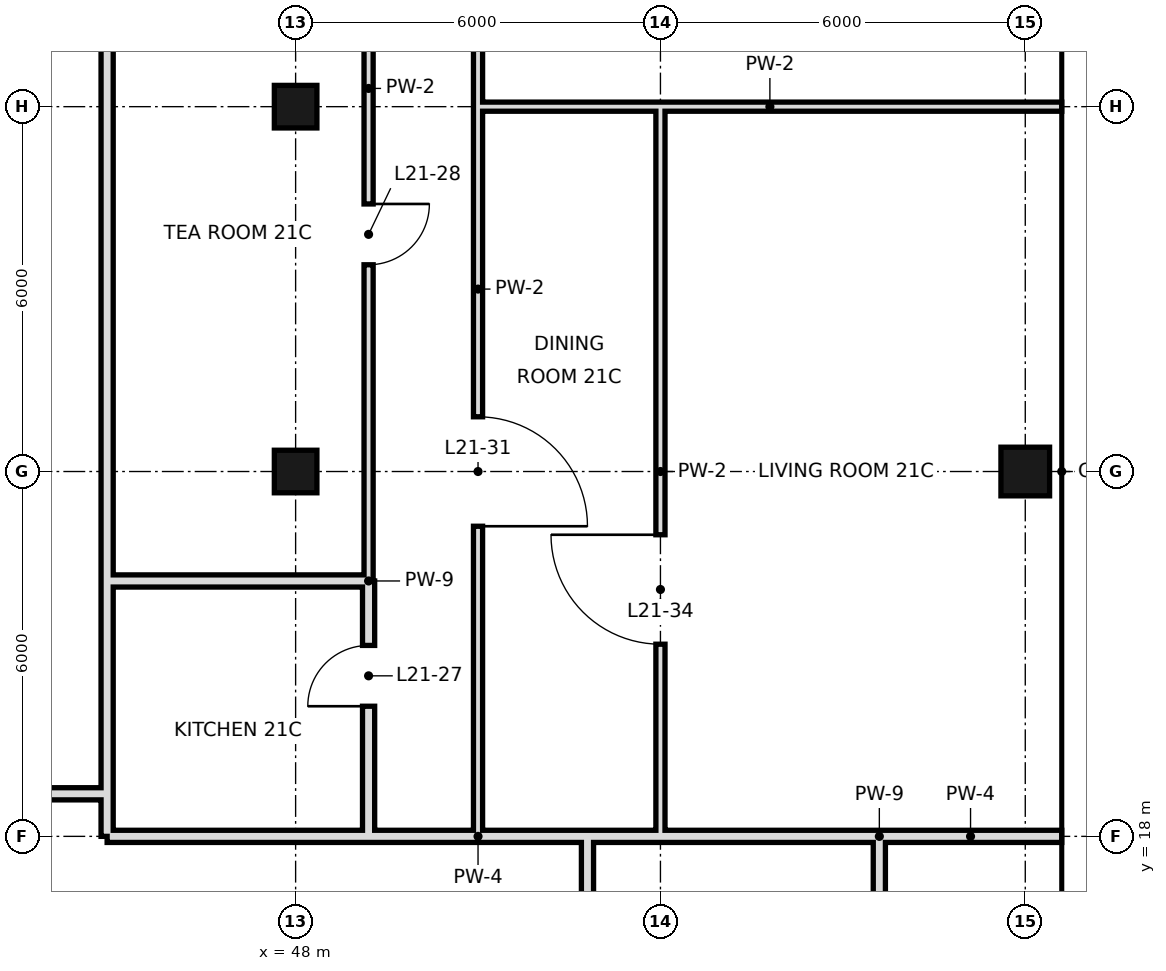
"""IFC4 building model, lengths in metres.
Left out: names, types, materials, properties, quantities, classifications, styles, units other than length and angle.
Written with IfcOpenShell. Run it as: python <this file> out.ifc"""

import sys

from ifc_helpers import new_model, si_unit, direction, frame, frame_2d, origin, origin_2d, place, context, subcontext, project, spatial, rectangle, hollow_rectangle, extrude, element, fill, save


model = new_model("IFC4")
c1 = context("Model", 3, precision=1e-05, world=origin(), true_north=direction((0.0, 1.0)))
c2 = subcontext(c1, "Body", "Model", "MODEL_VIEW")
j1 = project(units=[si_unit("LENGTHUNIT", "METRE"), si_unit("PLANEANGLEUNIT", "RADIAN")], contexts=[c1])
p1 = place(None, origin())
s1 = spatial("IfcSite", under=j1, at=p1, CompositionType="ELEMENT")
p2 = place(p1, origin())
s2 = spatial("IfcBuilding", under=s1, at=p2, CompositionType="ELEMENT")
p3 = place(p2, frame((0.0, 0.0, 99.8)))
s3 = spatial("IfcBuildingStorey", under=s2, at=p3, CompositionType="ELEMENT", Elevation=99.8)
for number, where, z_axis, x_axis in (
    (1, (48.0, 24.0, 0.0), (0.0, 0.0, 1.0), (1.0, 0.0, 0.0)),
    (2, (48.0, 30.0, 0.0), (0.0, 0.0, 1.0), (1.0, 0.0, 0.0)),
):
    element("IfcColumn", number, at=place(p3, frame(where, z_axis=z_axis, x_axis=x_axis)), inside=s3, PredefinedType="COLUMN", context=c2, shape_type="SweptSolid", body=[
        extrude(hollow_rectangle(XDim=0.7, YDim=0.7, WallThickness=0.036, at=origin_2d()), origin(), (0.0, 0.0, 1.0), 3.6),
    ])
p4 = place(p3, frame((60.0, 24.0, 0.0), z_axis=(0.0, 0.0, 1.0), x_axis=(1.0, 0.0, 0.0)))
e3 = element("IfcColumn", 3, at=p4, inside=s3, PredefinedType="COLUMN", context=c2, shape_type="SweptSolid", body=[
    extrude(hollow_rectangle(XDim=0.8, YDim=0.8, WallThickness=0.04, at=origin_2d()), origin(), (0.0, 0.0, 1.0), 3.6),
])
p5 = place(p3, frame((44.9, 22.2, 0.0), z_axis=(0.0, 0.0, 1.0), x_axis=(0.0, 1.0, 0.0)))
e4 = element("IfcWall", 4, at=p5, inside=s3, PredefinedType="SOLIDWALL", context=c2, shape_type="SweptSolid", body=[
    extrude(rectangle(XDim=26.4, YDim=0.2, at=frame_2d((13.2, 0.0))), origin(), (0.0, 0.0, 1.0), 2.72),
])
p6 = place(p5, frame((12.58, 0.0, 0.0)))
e5 = element("IfcOpeningElement", 5, at=p6, cuts=e4, PredefinedType="OPENING", context=c2, shape_type="SweptSolid", body=[
    extrude(rectangle(XDim=1.2, YDim=2.4, at=frame_2d((0.6, 1.2))), frame((0.0, 0.11, 0.0), z_axis=(0.0, -1.0, 0.0), x_axis=(1.0, 0.0, 0.0)), (0.0, 0.0, 1.0), 0.22),
])
p7 = place(p3, frame((44.9, 18.0, 0.0), z_axis=(0.0, 0.0, 1.0), x_axis=(0.0, 1.0, 0.0)))
e6 = element("IfcWall", 6, at=p7, inside=s3, PredefinedType="SOLIDWALL", context=c2, shape_type="SweptSolid", body=[
    extrude(rectangle(XDim=4.2, YDim=0.2, at=frame_2d((2.1, 0.0))), origin(), (0.0, 0.0, 1.0), 2.97),
])
p8 = place(p3, frame((49.2, 18.0, 0.0), z_axis=(0.0, 0.0, 1.0), x_axis=(0.0, 1.0, 0.0)))
e7 = element("IfcWall", 7, at=p8, inside=s3, PredefinedType="SOLIDWALL", context=c2, shape_type="SweptSolid", body=[
    extrude(rectangle(XDim=4.2, YDim=0.2, at=frame_2d((2.1, 0.0))), origin(), (0.0, 0.0, 1.0), 2.72),
])
p9 = place(p8, frame((2.14, 0.0, 0.0)))
e8 = element("IfcOpeningElement", 8, at=p9, cuts=e7, PredefinedType="OPENING", context=c2, shape_type="SweptSolid", body=[
    extrude(rectangle(XDim=1.0, YDim=2.4, at=frame_2d((0.5, 1.2))), frame((0.0, 0.11, 0.0), z_axis=(0.0, -1.0, 0.0), x_axis=(1.0, 0.0, 0.0)), (0.0, 0.0, 1.0), 0.22),
])
p10 = place(p3, frame((49.2, 22.2, 0.0), z_axis=(0.0, 0.0, 1.0), x_axis=(0.0, 1.0, 0.0)))
e9 = element("IfcWall", 9, at=p10, inside=s3, PredefinedType="PARTITIONING", context=c2, shape_type="SweptSolid", body=[
    extrude(rectangle(XDim=16.2, YDim=0.15, at=frame_2d((8.1, 0.0))), origin(), (0.0, 0.0, 1.0), 3.42),
])
p11 = place(p10, frame((12.15, 0.0, 0.0)))
e10 = element("IfcOpeningElement", 10, at=p11, cuts=e9, PredefinedType="OPENING", context=c2, shape_type="SweptSolid", body=[
    extrude(rectangle(XDim=1.0, YDim=2.4, at=frame_2d((0.5, 1.2))), frame((0.0, 0.085, 0.0), z_axis=(0.0, -1.0, 0.0), x_axis=(1.0, 0.0, 0.0)), (0.0, 0.0, 1.0), 0.17),
])
p12 = place(p10, frame((5.2, 0.0, 0.0)))
e11 = element("IfcOpeningElement", 11, at=p12, cuts=e9, PredefinedType="OPENING", context=c2, shape_type="SweptSolid", body=[
    extrude(rectangle(XDim=1.0, YDim=2.4, at=frame_2d((0.5, 1.2))), frame((0.0, 0.085, 0.0), z_axis=(0.0, -1.0, 0.0), x_axis=(1.0, 0.0, 0.0)), (0.0, 0.0, 1.0), 0.17),
])
p13 = place(p3, frame((51.0, 18.0, 0.0), z_axis=(0.0, 0.0, 1.0), x_axis=(0.0, 1.0, 0.0)))
e12 = element("IfcWall", 12, at=p13, inside=s3, PredefinedType="PARTITIONING", context=c2, shape_type="SweptSolid", body=[
    extrude(rectangle(XDim=18.0, YDim=0.15, at=frame_2d((9.0, 0.0))), origin(), (0.0, 0.0, 1.0), 3.42),
])
p14 = place(p13, frame((5.1, 0.0, 0.0)))
e13 = element("IfcOpeningElement", 13, at=p14, cuts=e12, PredefinedType="OPENING", context=c2, shape_type="SweptSolid", body=[
    extrude(rectangle(XDim=1.8, YDim=2.4, at=frame_2d((0.9, 1.2))), frame((0.0, 0.085, 0.0), z_axis=(0.0, -1.0, 0.0), x_axis=(1.0, 0.0, 0.0)), (0.0, 0.0, 1.0), 0.17),
])
p15 = place(p13, frame((13.36, 0.0, 0.0)))
e14 = element("IfcOpeningElement", 14, at=p15, cuts=e12, PredefinedType="OPENING", context=c2, shape_type="SweptSolid", body=[
    extrude(rectangle(XDim=1.8, YDim=2.4, at=frame_2d((0.9, 1.2))), frame((0.0, 0.085, 0.0), z_axis=(0.0, -1.0, 0.0), x_axis=(1.0, 0.0, 0.0)), (0.0, 0.0, 1.0), 0.17),
])
p16 = place(p3, frame((52.8, 10.8, 0.0), z_axis=(0.0, 0.0, 1.0), x_axis=(0.0, 1.0, 0.0)))
e15 = element("IfcWall", 15, at=p16, inside=s3, PredefinedType="SOLIDWALL", context=c2, shape_type="SweptSolid", body=[
    extrude(rectangle(XDim=7.2, YDim=0.2, at=frame_2d((3.6, 0.0))), origin(), (0.0, 0.0, 1.0), 2.72),
])
p17 = place(p3, frame((54.0, 18.0, 0.0), z_axis=(0.0, 0.0, 1.0), x_axis=(0.0, 1.0, 0.0)))
e16 = element("IfcWall", 16, at=p17, inside=s3, PredefinedType="PARTITIONING", context=c2, shape_type="SweptSolid", body=[
    extrude(rectangle(XDim=12.0, YDim=0.15, at=frame_2d((6.0, 0.0))), origin(), (0.0, 0.0, 1.0), 3.42),
])
p18 = place(p17, frame((3.16, 0.0, 0.0)))
e17 = element("IfcOpeningElement", 17, at=p18, cuts=e16, PredefinedType="OPENING", context=c2, shape_type="SweptSolid", body=[
    extrude(rectangle(XDim=1.8, YDim=2.4, at=frame_2d((0.9, 1.2))), frame((0.0, 0.085, 0.0), z_axis=(0.0, -1.0, 0.0), x_axis=(1.0, 0.0, 0.0)), (0.0, 0.0, 1.0), 0.17),
])
p19 = place(p3, frame((57.6, 10.8, 0.0), z_axis=(0.0, 0.0, 1.0), x_axis=(0.0, 1.0, 0.0)))
e18 = element("IfcWall", 18, at=p19, inside=s3, PredefinedType="SOLIDWALL", context=c2, shape_type="SweptSolid", body=[
    extrude(rectangle(XDim=7.2, YDim=0.2, at=frame_2d((3.6, 0.0))), origin(), (0.0, 0.0, 1.0), 2.72),
])
p20 = place(p3, frame((44.9, 18.0, 0.0), z_axis=(0.0, 0.0, 1.0), x_axis=(1.0, 0.0, 0.0)))
e19 = element("IfcWall", 19, at=p20, inside=s3, PredefinedType="SOLIDWALL", context=c2, shape_type="SweptSolid", body=[
    extrude(rectangle(XDim=4.3, YDim=0.2, at=frame_2d((2.15, 0.0))), origin(), (0.0, 0.0, 1.0), 2.72),
])
p21 = place(p3, frame((52.8, 18.0, 0.0), z_axis=(0.0, 0.0, 1.0), x_axis=(1.0, 0.0, 0.0)))
e20 = element("IfcWall", 20, at=p21, inside=s3, PredefinedType="SOLIDWALL", context=c2, shape_type="SweptSolid", body=[
    extrude(rectangle(XDim=4.8, YDim=0.2, at=frame_2d((2.4, 0.0))), origin(), (0.0, 0.0, 1.0), 2.72),
])
p22 = place(p3, frame((49.2, 18.0, 0.0), z_axis=(0.0, 0.0, 1.0), x_axis=(1.0, 0.0, 0.0)))
e21 = element("IfcWall", 21, at=p22, inside=s3, PredefinedType="SOLIDWALL", context=c2, shape_type="SweptSolid", body=[
    extrude(rectangle(XDim=3.6, YDim=0.2, at=frame_2d((1.8, 0.0))), origin(), (0.0, 0.0, 1.0), 2.72),
])
p23 = place(p3, frame((57.6, 18.0, 0.0), z_axis=(0.0, 0.0, 1.0), x_axis=(1.0, 0.0, 0.0)))
e22 = element("IfcWall", 22, at=p23, inside=s3, PredefinedType="SOLIDWALL", context=c2, shape_type="SweptSolid", body=[
    extrude(rectangle(XDim=3.0, YDim=0.2, at=frame_2d((1.5, 0.0))), origin(), (0.0, 0.0, 1.0), 2.72),
])
p24 = place(p3, frame((12.6, 18.7, 0.0), z_axis=(0.0, 0.0, 1.0), x_axis=(1.0, 0.0, 0.0)))
e23 = element("IfcWall", 23, at=p24, inside=s3, PredefinedType="SOLIDWALL", context=c2, shape_type="SweptSolid", body=[
    extrude(rectangle(XDim=32.3, YDim=0.2, at=frame_2d((16.15, 0.0))), origin(), (0.0, 0.0, 1.0), 2.72),
])
p25 = place(p24, frame((7.78, 0.0, 0.0)))
e24 = element("IfcOpeningElement", 24, at=p25, cuts=e23, PredefinedType="OPENING", context=c2, shape_type="SweptSolid", body=[
    extrude(rectangle(XDim=1.2, YDim=2.4, at=frame_2d((0.6, 1.2))), frame((0.0, 0.11, 0.0), z_axis=(0.0, -1.0, 0.0), x_axis=(1.0, 0.0, 0.0)), (0.0, 0.0, 1.0), 0.22),
])
p26 = place(p24, frame((24.6, 0.0, 0.0)))
e25 = element("IfcOpeningElement", 25, at=p26, cuts=e23, PredefinedType="OPENING", context=c2, shape_type="SweptSolid", body=[
    extrude(rectangle(XDim=1.2, YDim=2.4, at=frame_2d((0.6, 1.2))), frame((0.0, 0.11, 0.0), z_axis=(0.0, -1.0, 0.0), x_axis=(1.0, 0.0, 0.0)), (0.0, 0.0, 1.0), 0.22),
])
p27 = place(p3, frame((44.9, 22.2, 0.0), z_axis=(0.0, 0.0, 1.0), x_axis=(1.0, 0.0, 0.0)))
e26 = element("IfcWall", 26, at=p27, inside=s3, PredefinedType="SOLIDWALL", context=c2, shape_type="SweptSolid", body=[
    extrude(rectangle(XDim=4.3, YDim=0.2, at=frame_2d((2.15, 0.0))), origin(), (0.0, 0.0, 1.0), 2.72),
])
p28 = place(p3, frame((51.0, 30.0, 0.0), z_axis=(0.0, 0.0, 1.0), x_axis=(1.0, 0.0, 0.0)))
e27 = element("IfcWall", 27, at=p28, inside=s3, PredefinedType="PARTITIONING", context=c2, shape_type="SweptSolid", body=[
    extrude(rectangle(XDim=9.6, YDim=0.15, at=frame_2d((4.8, 0.0))), origin(), (0.0, 0.0, 1.0), 2.72),
])
p29 = place(p9, origin())
e28 = element("IfcDoor", 28, at=p29, inside=s3, OperationType="SINGLE_SWING_LEFT", PredefinedType="DOOR", context=c2, shape_type="SweptSolid", body=[
    extrude(rectangle(XDim=1.0, YDim=2.4, at=frame_2d((0.5, 1.2))), frame((0.0, 0.025, 0.0), z_axis=(0.0, -1.0, 0.0), x_axis=(1.0, 0.0, 0.0)), (0.0, 0.0, 1.0), 0.05),
])
fill(e8, e28)
p30 = place(p12, origin())
e29 = element("IfcDoor", 29, at=p30, inside=s3, OperationType="SINGLE_SWING_RIGHT", PredefinedType="DOOR", context=c2, shape_type="SweptSolid", body=[
    extrude(rectangle(XDim=1.0, YDim=2.4, at=frame_2d((0.5, 1.2))), frame((0.0, 0.025, 0.0), z_axis=(0.0, -1.0, 0.0), x_axis=(1.0, 0.0, 0.0)), (0.0, 0.0, 1.0), 0.05),
])
fill(e11, e29)
p31 = place(p14, frame((1.8, 0.0, 0.0), z_axis=(0.0, 0.0, 1.0), x_axis=(-1.0, 0.0, 0.0)))
e30 = element("IfcDoor", 30, at=p31, inside=s3, OperationType="SINGLE_SWING_RIGHT", PredefinedType="DOOR", context=c2, shape_type="SweptSolid", body=[
    extrude(rectangle(XDim=1.8, YDim=2.4, at=frame_2d((0.9, 1.2))), frame((0.0, 0.025, 0.0), z_axis=(0.0, -1.0, 0.0), x_axis=(1.0, 0.0, 0.0)), (0.0, 0.0, 1.0), 0.05),
])
fill(e13, e30)
p32 = place(p18, frame((1.8, 0.0, 0.0), z_axis=(0.0, 0.0, 1.0), x_axis=(-1.0, 0.0, 0.0)))
e31 = element("IfcDoor", 31, at=p32, inside=s3, OperationType="SINGLE_SWING_LEFT", PredefinedType="DOOR", context=c2, shape_type="SweptSolid", body=[
    extrude(rectangle(XDim=1.8, YDim=2.4, at=frame_2d((0.9, 1.2))), frame((0.0, 0.025, 0.0), z_axis=(0.0, -1.0, 0.0), x_axis=(1.0, 0.0, 0.0)), (0.0, 0.0, 1.0), 0.05),
])
fill(e17, e31)
save(model, sys.argv[1])
